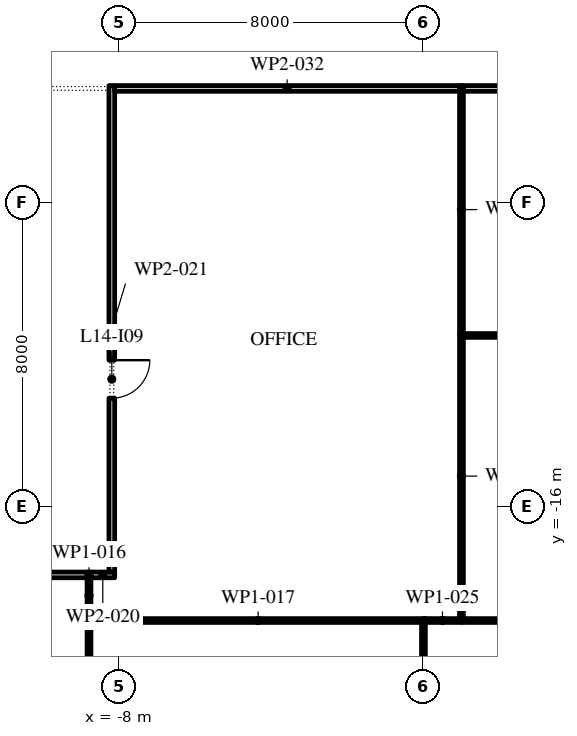
"""IFC4 building model, lengths in metres.
Left out: names, types, materials, properties, quantities, classifications, styles, units other than length and angle.
Written with IfcOpenShell. Run it as: python <this file> out.ifc"""

import sys

from ifc_helpers import new_model, si_unit, direction, frame, frame_2d, origin, place, context, subcontext, project, spatial, rectangle, extrude, element, fill, save


model = new_model("IFC4")
c1 = context("Model", 3, precision=1e-05, world=origin(), true_north=direction((0.0, 1.0)))
c2 = subcontext(c1, "Body", "Model", "MODEL_VIEW")
j1 = project(units=[si_unit("LENGTHUNIT", "METRE"), si_unit("PLANEANGLEUNIT", "RADIAN")], contexts=[c1])
p1 = place(None, origin())
s1 = spatial("IfcSite", under=j1, at=p1, CompositionType="ELEMENT")
p2 = place(p1, origin())
s2 = spatial("IfcBuilding", under=s1, at=p2, CompositionType="ELEMENT")
p3 = place(p2, frame((0.0, 0.0, 69.0)))
s3 = spatial("IfcBuildingStorey", under=s2, at=p3, CompositionType="ELEMENT", Elevation=69.0)
p4 = place(p3, frame((-8.8, -27.8, 0.0), z_axis=(0.0, 0.0, 1.0), x_axis=(0.0, 1.0, 0.0)))
e1 = element("IfcWall", 1, at=p4, inside=s3, PredefinedType="PARTITIONING", context=c2, shape_type="SweptSolid", body=[
    extrude(rectangle(XDim=8.85, YDim=0.1, at=frame_2d((4.425, 0.0))), origin(), (0.0, 0.0, 1.0), 4.0),
])
p5 = place(p4, frame((3.0, 0.0, 0.0)))
e2 = element("IfcOpeningElement", 2, at=p5, cuts=e1, PredefinedType="OPENING", context=c2, shape_type="SweptSolid", body=[
    extrude(rectangle(XDim=0.9, YDim=2.1, at=frame_2d((0.45, 1.05))), frame((0.0, 0.06, 0.0), z_axis=(0.0, -1.0, 0.0), x_axis=(1.0, 0.0, 0.0)), (0.0, 0.0, 1.0), 0.12),
])
p6 = place(p3, frame((-8.8, -18.95, 0.0), z_axis=(0.0, 0.0, 1.0), x_axis=(0.0, 1.0, 0.0)))
e3 = element("IfcWall", 3, at=p6, inside=s3, PredefinedType="PARTITIONING", context=c2, shape_type="SweptSolid", body=[
    extrude(rectangle(XDim=1.225, YDim=0.1, at=frame_2d((0.612, 0.0))), origin(), (0.0, 0.0, 1.0), 4.0),
])
p7 = place(p3, frame((-8.75, -19.0, 0.0), z_axis=(0.0, 0.0, 1.0), x_axis=(1.0, 0.0, 0.0)))
e4 = element("IfcWall", 4, at=p7, inside=s3, PredefinedType="PARTITIONING", context=c2, shape_type="SweptSolid", body=[
    extrude(rectangle(XDim=8.8, YDim=0.1, at=frame_2d((4.4, 0.0))), origin(), (0.0, 0.0, 1.0), 4.0),
])
p8 = place(p3, frame((-8.85, -17.8, 0.0), z_axis=(0.0, 0.0, 1.0), x_axis=(-1.0, 0.0, 0.0)))
e5 = element("IfcWall", 5, at=p8, inside=s3, PredefinedType="PARTITIONING", context=c2, shape_type="SweptSolid", body=[
    extrude(rectangle(XDim=8.7, YDim=0.15, at=frame_2d((4.35, 0.0))), origin(), (0.0, 0.0, 1.0), 4.0),
])
p9 = place(p8, frame((4.85, 0.0, 0.0)))
e6 = element("IfcOpeningElement", 6, at=p9, cuts=e5, PredefinedType="OPENING", context=c2, shape_type="SweptSolid", body=[
    extrude(rectangle(XDim=1.0, YDim=2.1, at=frame_2d((0.5, 1.05))), frame((0.0, 0.085, 0.0), z_axis=(0.0, -1.0, 0.0), x_axis=(1.0, 0.0, 0.0)), (0.0, 0.0, 1.0), 0.17),
])
p10 = place(p3, frame((-8.125, -17.8, 0.0), z_axis=(0.0, 0.0, 1.0), x_axis=(-1.0, 0.0, 0.0)))
e7 = element("IfcWall", 7, at=p10, inside=s3, PredefinedType="PARTITIONING", context=c2, shape_type="SweptSolid", body=[
    extrude(rectangle(XDim=0.625, YDim=0.15, at=frame_2d((0.312, 0.0))), origin(), (0.0, 0.0, 1.0), 4.0),
])
p11 = place(p3, frame((-8.2, -4.925, 0.0), z_axis=(0.0, 0.0, 1.0), x_axis=(0.0, -1.0, 0.0)))
e8 = element("IfcWall", 8, at=p11, inside=s3, PredefinedType="PARTITIONING", context=c2, shape_type="SweptSolid", body=[
    extrude(rectangle(XDim=12.8, YDim=0.15, at=frame_2d((6.4, 0.0))), origin(), (0.0, 0.0, 1.0), 4.0),
])
p12 = place(p11, frame((7.225, 0.0, 0.0)))
e9 = element("IfcOpeningElement", 9, at=p12, cuts=e8, PredefinedType="OPENING", context=c2, shape_type="SweptSolid", body=[
    extrude(rectangle(XDim=1.0, YDim=2.1, at=frame_2d((0.5, 1.05))), frame((0.0, 0.085, 0.0), z_axis=(0.0, -1.0, 0.0), x_axis=(1.0, 0.0, 0.0)), (0.0, 0.0, 1.0), 0.17),
])
p13 = place(p3, frame((0.0, -19.05, 0.0), z_axis=(0.0, 0.0, 1.0), x_axis=(0.0, -1.0, 0.0)))
e10 = element("IfcWall", 10, at=p13, inside=s3, PredefinedType="PARTITIONING", context=c2, shape_type="SweptSolid", body=[
    extrude(rectangle(XDim=8.75, YDim=0.1, at=frame_2d((4.375, 0.0))), origin(), (0.0, 0.0, 1.0), 4.0),
])
p14 = place(p3, frame((0.0, -19.0, 0.0), z_axis=(0.0, 0.0, 1.0), x_axis=(1.0, 0.0, 0.0)))
e11 = element("IfcWall", 11, at=p14, inside=s3, PredefinedType="PARTITIONING", context=c2, shape_type="SweptSolid", body=[
    extrude(rectangle(XDim=1.0, YDim=0.1, at=frame_2d((0.5, 0.0))), origin(), (0.0, 0.0, 1.0), 4.0),
])
p15 = place(p3, frame((1.0, -18.95, 0.0), z_axis=(0.0, 0.0, 1.0), x_axis=(0.0, 1.0, 0.0)))
e12 = element("IfcWall", 12, at=p15, inside=s3, PredefinedType="PARTITIONING", context=c2, shape_type="SweptSolid", body=[
    extrude(rectangle(XDim=7.5, YDim=0.1, at=frame_2d((3.75, 0.0))), origin(), (0.0, 0.0, 1.0), 4.0),
])
p16 = place(p3, frame((1.0, -19.0, 0.0), z_axis=(0.0, 0.0, 1.0), x_axis=(1.0, 0.0, 0.0)))
e13 = element("IfcWall", 13, at=p16, inside=s3, PredefinedType="PARTITIONING", context=c2, shape_type="SweptSolid", body=[
    extrude(rectangle(XDim=7.85, YDim=0.1, at=frame_2d((3.925, 0.0))), origin(), (0.0, 0.0, 1.0), 4.0),
])
p17 = place(p3, frame((1.0, -11.45, 0.0), z_axis=(0.0, 0.0, 1.0), x_axis=(0.0, 1.0, 0.0)))
e14 = element("IfcWall", 14, at=p17, inside=s3, PredefinedType="PARTITIONING", context=c2, shape_type="SweptSolid", body=[
    extrude(rectangle(XDim=6.525, YDim=0.1, at=frame_2d((3.262, 0.0))), origin(), (0.0, 0.0, 1.0), 4.0),
])
p18 = place(p3, frame((1.05, -11.5, 0.0), z_axis=(0.0, 0.0, 1.0), x_axis=(1.0, 0.0, 0.0)))
e15 = element("IfcWall", 15, at=p18, inside=s3, PredefinedType="PARTITIONING", context=c2, shape_type="SweptSolid", body=[
    extrude(rectangle(XDim=7.225, YDim=0.1, at=frame_2d((3.612, 0.0))), origin(), (0.0, 0.0, 1.0), 4.0),
])
p19 = place(p3, frame((0.95, -5.0, 0.0), z_axis=(0.0, 0.0, 1.0), x_axis=(-1.0, 0.0, 0.0)))
e16 = element("IfcWall", 16, at=p19, inside=s3, PredefinedType="PARTITIONING", context=c2, shape_type="SweptSolid", body=[
    extrude(rectangle(XDim=9.075, YDim=0.15, at=frame_2d((4.538, 0.0))), origin(), (0.0, 0.0, 1.0), 4.0),
])
p20 = place(p3, frame((8.125, -5.0, 0.0), z_axis=(0.0, 0.0, 1.0), x_axis=(-1.0, 0.0, 0.0)))
e17 = element("IfcWall", 17, at=p20, inside=s3, PredefinedType="PARTITIONING", context=c2, shape_type="SweptSolid", body=[
    extrude(rectangle(XDim=7.075, YDim=0.15, at=frame_2d((3.538, 0.0))), origin(), (0.0, 0.0, 1.0), 4.0),
])
p21 = place(p20, frame((2.975, 0.0, 0.0)))
e18 = element("IfcOpeningElement", 18, at=p21, cuts=e17, PredefinedType="OPENING", context=c2, shape_type="SweptSolid", body=[
    extrude(rectangle(XDim=1.0, YDim=2.1, at=frame_2d((0.5, 1.05))), frame((0.0, 0.085, 0.0), z_axis=(0.0, -1.0, 0.0), x_axis=(1.0, 0.0, 0.0)), (0.0, 0.0, 1.0), 0.17),
])
p22 = place(p12, origin())
e19 = element("IfcDoor", 19, at=p22, inside=s3, OperationType="SINGLE_SWING_RIGHT", PredefinedType="DOOR", context=c2, shape_type="SweptSolid", body=[
    extrude(rectangle(XDim=1.0, YDim=2.1, at=frame_2d((0.5, 1.05))), frame((0.0, 0.025, 0.0), z_axis=(0.0, -1.0, 0.0), x_axis=(1.0, 0.0, 0.0)), (0.0, 0.0, 1.0), 0.05),
])
fill(e9, e19)
save(model, sys.argv[1])
